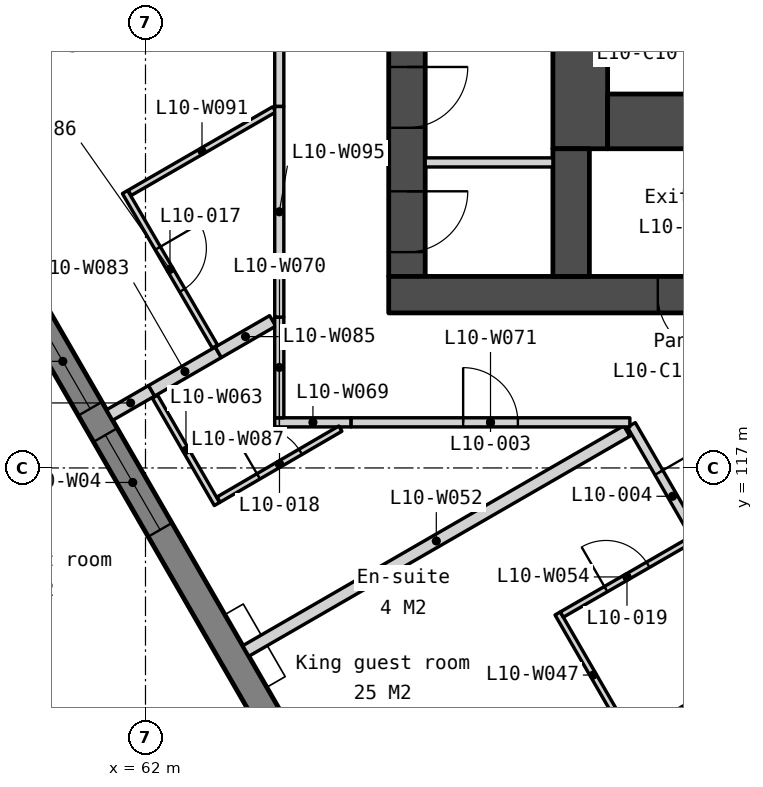
"""IFC4 building model, lengths in metres.
Left out: names, types, materials, properties, quantities, classifications, styles, units other than length and angle.
Written with IfcOpenShell. Run it as: python <this file> out.ifc"""

import sys

from ifc_helpers import new_model, si_unit, direction, frame, frame_2d, origin, place, context, subcontext, project, spatial, polyline, rectangle, outline, extrude, element, fill, save


model = new_model("IFC4")
c1 = context("Model", 3, precision=1e-05, world=origin(), true_north=direction((0.0, 1.0)))
c2 = subcontext(c1, "Body", "Model", "MODEL_VIEW")
j1 = project(units=[si_unit("LENGTHUNIT", "METRE"), si_unit("PLANEANGLEUNIT", "RADIAN")], contexts=[c1])
p1 = place(None, origin())
s1 = spatial("IfcSite", under=j1, at=p1, CompositionType="ELEMENT")
p2 = place(p1, origin())
s2 = spatial("IfcBuilding", under=s1, at=p2, CompositionType="ELEMENT")
p3 = place(p2, frame((0.0, 0.0, 49.0)))
s3 = spatial("IfcBuildingStorey", under=s2, at=p3, CompositionType="ELEMENT", Elevation=49.0)
p4 = place(p3, frame((66.3, 133.95, 0.0), z_axis=(0.0, 0.0, 1.0), x_axis=(0.0, -1.0, 0.0)))
e1 = element("IfcWall", 1, at=p4, inside=s3, PredefinedType="SOLIDWALL", context=c2, shape_type="SweptSolid", body=[
    extrude(rectangle(XDim=13.8, YDim=0.6, at=frame_2d((6.9, 0.0))), origin(), (0.0, 0.0, 1.0), 3.35),
])
p5 = place(p4, frame((0.6, 0.0, 0.0)))
e2 = element("IfcOpeningElement", 2, at=p5, cuts=e1, PredefinedType="OPENING", context=c2, shape_type="SweptSolid", body=[
    extrude(rectangle(XDim=1.1, YDim=2.1, at=frame_2d((0.55, 1.05))), frame((0.0, 0.31, 0.0), z_axis=(0.0, -1.0, 0.0), x_axis=(1.0, 0.0, 0.0)), (0.0, 0.0, 1.0), 0.62),
])
p6 = place(p4, frame((8.405, 0.0, 0.0)))
e3 = element("IfcOpeningElement", 3, at=p6, cuts=e1, PredefinedType="OPENING", context=c2, shape_type="SweptSolid", body=[
    extrude(rectangle(XDim=1.0, YDim=2.1, at=frame_2d((0.5, 1.05))), frame((0.0, 0.31, 0.0), z_axis=(0.0, -1.0, 0.0), x_axis=(1.0, 0.0, 0.0)), (0.0, 0.0, 1.0), 0.62),
])
p7 = place(p4, frame((10.355, 0.0, 0.0)))
e4 = element("IfcOpeningElement", 4, at=p7, cuts=e1, PredefinedType="OPENING", context=c2, shape_type="SweptSolid", body=[
    extrude(rectangle(XDim=1.0, YDim=2.1, at=frame_2d((0.5, 1.05))), frame((0.0, 0.31, 0.0), z_axis=(0.0, -1.0, 0.0), x_axis=(1.0, 0.0, 0.0)), (0.0, 0.0, 1.0), 0.62),
])
p8 = place(p4, frame((12.4, 0.0, 0.0)))
e5 = element("IfcOpeningElement", 5, at=p8, cuts=e1, PredefinedType="OPENING", context=c2, shape_type="SweptSolid", body=[
    extrude(rectangle(XDim=1.0, YDim=2.1, at=frame_2d((0.5, 1.05))), frame((0.0, 0.31, 0.0), z_axis=(0.0, -1.0, 0.0), x_axis=(1.0, 0.0, 0.0)), (0.0, 0.0, 1.0), 0.62),
])
p9 = place(p3, frame((66.0, 119.85, 0.0), z_axis=(0.0, 0.0, 1.0), x_axis=(1.0, 0.0, 0.0)))
e6 = element("IfcWall", 6, at=p9, inside=s3, PredefinedType="SOLIDWALL", context=c2, shape_type="SweptSolid", body=[
    extrude(rectangle(XDim=28.0, YDim=0.6, at=frame_2d((14.0, 0.0))), origin(), (0.0, 0.0, 1.0), 3.35),
])
p10 = place(p9, frame((6.825, 0.0, 0.0)))
e7 = element("IfcOpeningElement", 7, at=p10, cuts=e6, PredefinedType="OPENING", context=c2, shape_type="SweptSolid", body=[
    extrude(rectangle(XDim=1.8, YDim=2.1, at=frame_2d((0.9, 1.05))), frame((0.0, 0.31, 0.0), z_axis=(0.0, -1.0, 0.0), x_axis=(1.0, 0.0, 0.0)), (0.0, 0.0, 1.0), 0.62),
])
p11 = place(p9, frame((15.85, 0.0, 0.0)))
e8 = element("IfcOpeningElement", 8, at=p11, cuts=e6, PredefinedType="OPENING", context=c2, shape_type="SweptSolid", body=[
    extrude(rectangle(XDim=1.5, YDim=2.1, at=frame_2d((0.75, 1.05))), frame((0.0, 0.31, 0.0), z_axis=(0.0, -1.0, 0.0), x_axis=(1.0, 0.0, 0.0)), (0.0, 0.0, 1.0), 0.62),
])
p12 = place(p9, frame((19.375, 0.0, 0.0)))
e9 = element("IfcOpeningElement", 9, at=p12, cuts=e6, PredefinedType="OPENING", context=c2, shape_type="SweptSolid", body=[
    extrude(rectangle(XDim=1.8, YDim=2.1, at=frame_2d((0.9, 1.05))), frame((0.0, 0.31, 0.0), z_axis=(0.0, -1.0, 0.0), x_axis=(1.0, 0.0, 0.0)), (0.0, 0.0, 1.0), 0.62),
])
p13 = place(p9, frame((4.425, 0.0, 0.0)))
e10 = element("IfcOpeningElement", 10, at=p13, cuts=e6, PredefinedType="OPENING", context=c2, shape_type="SweptSolid", body=[
    extrude(rectangle(XDim=1.0, YDim=2.1, at=frame_2d((0.5, 1.05))), frame((0.0, 0.31, 0.0), z_axis=(0.0, -1.0, 0.0), x_axis=(1.0, 0.0, 0.0)), (0.0, 0.0, 1.0), 0.62),
])
p14 = place(p9, frame((9.783, 0.0, 0.0)))
e11 = element("IfcOpeningElement", 11, at=p14, cuts=e6, PredefinedType="OPENING", context=c2, shape_type="SweptSolid", body=[
    extrude(rectangle(XDim=1.0, YDim=2.1, at=frame_2d((0.5, 1.05))), frame((0.0, 0.31, 0.0), z_axis=(0.0, -1.0, 0.0), x_axis=(1.0, 0.0, 0.0)), (0.0, 0.0, 1.0), 0.62),
])
p15 = place(p9, frame((11.525, 0.0, 0.0)))
e12 = element("IfcOpeningElement", 12, at=p15, cuts=e6, PredefinedType="OPENING", context=c2, shape_type="SweptSolid", body=[
    extrude(rectangle(XDim=1.0, YDim=2.1, at=frame_2d((0.5, 1.05))), frame((0.0, 0.31, 0.0), z_axis=(0.0, -1.0, 0.0), x_axis=(1.0, 0.0, 0.0)), (0.0, 0.0, 1.0), 0.62),
])
p16 = place(p9, frame((13.658, 0.0, 0.0)))
e13 = element("IfcOpeningElement", 13, at=p16, cuts=e6, PredefinedType="OPENING", context=c2, shape_type="SweptSolid", body=[
    extrude(rectangle(XDim=1.0, YDim=2.1, at=frame_2d((0.5, 1.05))), frame((0.0, 0.31, 0.0), z_axis=(0.0, -1.0, 0.0), x_axis=(1.0, 0.0, 0.0)), (0.0, 0.0, 1.0), 0.62),
])
p17 = place(p9, frame((21.725, 0.0, 0.0)))
e14 = element("IfcOpeningElement", 14, at=p17, cuts=e6, PredefinedType="OPENING", context=c2, shape_type="SweptSolid", body=[
    extrude(rectangle(XDim=1.0, YDim=2.1, at=frame_2d((0.5, 1.05))), frame((0.0, 0.31, 0.0), z_axis=(0.0, -1.0, 0.0), x_axis=(1.0, 0.0, 0.0)), (0.0, 0.0, 1.0), 0.62),
])
p18 = place(p9, frame((23.425, 0.0, 0.0)))
e15 = element("IfcOpeningElement", 15, at=p18, cuts=e6, PredefinedType="OPENING", context=c2, shape_type="SweptSolid", body=[
    extrude(rectangle(XDim=1.0, YDim=2.1, at=frame_2d((0.5, 1.05))), frame((0.0, 0.31, 0.0), z_axis=(0.0, -1.0, 0.0), x_axis=(1.0, 0.0, 0.0)), (0.0, 0.0, 1.0), 0.62),
])
p19 = place(p3, frame((66.6, 122.025, 0.0), z_axis=(0.0, 0.0, 1.0), x_axis=(1.0, 0.0, 0.0)))
e16 = element("IfcWall", 16, at=p19, inside=s3, PredefinedType="PARTITIONING", context=c2, shape_type="SweptSolid", body=[
    extrude(rectangle(XDim=2.1, YDim=0.15, at=frame_2d((1.05, 0.0))), origin(), (0.0, 0.0, 1.0), 3.35),
])
p20 = place(p3, frame((69.15, 133.95, 0.0), z_axis=(0.0, 0.0, 1.0), x_axis=(0.0, -1.0, 0.0)))
e17 = element("IfcWall", 17, at=p20, inside=s3, PredefinedType="SOLIDWALL", context=c2, shape_type="SweptSolid", body=[
    extrude(rectangle(XDim=11.7, YDim=0.9, at=frame_2d((5.85, 0.0))), origin(), (0.0, 0.0, 1.0), 3.35),
])
p21 = place(p3, frame((69.0, 122.25, 0.0), z_axis=(0.0, 0.0, 1.0), x_axis=(0.0, -1.0, 0.0)))
e18 = element("IfcWall", 18, at=p21, inside=s3, PredefinedType="SOLIDWALL", context=c2, shape_type="SweptSolid", body=[
    extrude(rectangle(XDim=2.1, YDim=0.6, at=frame_2d((1.05, 0.0))), origin(), (0.0, 0.0, 1.0), 3.35),
])
p22 = place(p3, frame((69.6, 122.7, 0.0), z_axis=(0.0, 0.0, 1.0), x_axis=(1.0, 0.0, 0.0)))
e19 = element("IfcWall", 19, at=p22, inside=s3, PredefinedType="SOLIDWALL", context=c2, shape_type="SweptSolid", body=[
    extrude(rectangle(XDim=2.55, YDim=0.9, at=frame_2d((1.275, 0.0))), origin(), (0.0, 0.0, 1.0), 3.35),
])
p23 = place(p3, frame((54.495, 129.397, -0.15), z_axis=(0.0, 0.0, 1.0), x_axis=(0.499999201451, -0.866025864826, 0.0)))
e20 = element("IfcWall", 20, at=p23, inside=s3, PredefinedType="SOLIDWALL", context=c2, shape_type="SweptSolid", body=[
    extrude(outline(polyline([(44.8, 0.0), (44.8, 3.5), (0.0, 3.5), (0.0, 0.0), (44.8, 0.0)])), frame((0.0, 0.225, 0.0), z_axis=(0.0, -1.0, 0.0), x_axis=(1.0, 0.0, 0.0)), (0.0, 0.0, 1.0), 0.45),
])
p24 = place(p23, frame((2.43, 0.0, 1.05)))
e21 = element("IfcOpeningElement", 21, at=p24, cuts=e20, PredefinedType="OPENING", context=c2, shape_type="SweptSolid", body=[
    extrude(rectangle(XDim=1.8, YDim=1.5, at=frame_2d((0.9, 0.75))), frame((0.0, 0.235, 0.0), z_axis=(0.0, -1.0, 0.0), x_axis=(1.0, 0.0, 0.0)), (0.0, 0.0, 1.0), 0.47),
])
p25 = place(p23, frame((4.73, 0.0, 1.05)))
e22 = element("IfcOpeningElement", 22, at=p25, cuts=e20, PredefinedType="OPENING", context=c2, shape_type="SweptSolid", body=[
    extrude(rectangle(XDim=1.8, YDim=1.5, at=frame_2d((0.9, 0.75))), frame((0.0, 0.235, 0.0), z_axis=(0.0, -1.0, 0.0), x_axis=(1.0, 0.0, 0.0)), (0.0, 0.0, 1.0), 0.47),
])
p26 = place(p23, frame((11.39, 0.0, 1.05)))
e23 = element("IfcOpeningElement", 23, at=p26, cuts=e20, PredefinedType="OPENING", context=c2, shape_type="SweptSolid", body=[
    extrude(rectangle(XDim=1.8, YDim=1.5, at=frame_2d((0.9, 0.75))), frame((0.0, 0.235, 0.0), z_axis=(0.0, -1.0, 0.0), x_axis=(1.0, 0.0, 0.0)), (0.0, 0.0, 1.0), 0.47),
])
p27 = place(p23, frame((13.69, 0.0, 1.05)))
e24 = element("IfcOpeningElement", 24, at=p27, cuts=e20, PredefinedType="OPENING", context=c2, shape_type="SweptSolid", body=[
    extrude(rectangle(XDim=1.8, YDim=1.5, at=frame_2d((0.9, 0.75))), frame((0.0, 0.235, 0.0), z_axis=(0.0, -1.0, 0.0), x_axis=(1.0, 0.0, 0.0)), (0.0, 0.0, 1.0), 0.47),
])
p28 = place(p23, frame((20.35, 0.0, 1.05)))
e25 = element("IfcOpeningElement", 25, at=p28, cuts=e20, PredefinedType="OPENING", context=c2, shape_type="SweptSolid", body=[
    extrude(rectangle(XDim=1.8, YDim=1.5, at=frame_2d((0.9, 0.75))), frame((0.0, 0.235, 0.0), z_axis=(0.0, -1.0, 0.0), x_axis=(1.0, 0.0, 0.0)), (0.0, 0.0, 1.0), 0.47),
])
p29 = place(p23, frame((22.65, 0.0, 1.05)))
e26 = element("IfcOpeningElement", 26, at=p29, cuts=e20, PredefinedType="OPENING", context=c2, shape_type="SweptSolid", body=[
    extrude(rectangle(XDim=1.8, YDim=1.5, at=frame_2d((0.9, 0.75))), frame((0.0, 0.235, 0.0), z_axis=(0.0, -1.0, 0.0), x_axis=(1.0, 0.0, 0.0)), (0.0, 0.0, 1.0), 0.47),
])
p30 = place(p23, frame((29.31, 0.0, 1.05)))
e27 = element("IfcOpeningElement", 27, at=p30, cuts=e20, PredefinedType="OPENING", context=c2, shape_type="SweptSolid", body=[
    extrude(rectangle(XDim=1.8, YDim=1.5, at=frame_2d((0.9, 0.75))), frame((0.0, 0.235, 0.0), z_axis=(0.0, -1.0, 0.0), x_axis=(1.0, 0.0, 0.0)), (0.0, 0.0, 1.0), 0.47),
])
p31 = place(p23, frame((31.61, 0.0, 1.05)))
e28 = element("IfcOpeningElement", 28, at=p31, cuts=e20, PredefinedType="OPENING", context=c2, shape_type="SweptSolid", body=[
    extrude(rectangle(XDim=1.8, YDim=1.5, at=frame_2d((0.9, 0.75))), frame((0.0, 0.235, 0.0), z_axis=(0.0, -1.0, 0.0), x_axis=(1.0, 0.0, 0.0)), (0.0, 0.0, 1.0), 0.47),
])
p32 = place(p23, frame((38.27, 0.0, 1.05)))
e29 = element("IfcOpeningElement", 29, at=p32, cuts=e20, PredefinedType="OPENING", context=c2, shape_type="SweptSolid", body=[
    extrude(rectangle(XDim=1.8, YDim=1.5, at=frame_2d((0.9, 0.75))), frame((0.0, 0.235, 0.0), z_axis=(0.0, -1.0, 0.0), x_axis=(1.0, 0.0, 0.0)), (0.0, 0.0, 1.0), 0.47),
])
p33 = place(p23, frame((40.57, 0.0, 1.05)))
e30 = element("IfcOpeningElement", 30, at=p33, cuts=e20, PredefinedType="OPENING", context=c2, shape_type="SweptSolid", body=[
    extrude(rectangle(XDim=1.8, YDim=1.5, at=frame_2d((0.9, 0.75))), frame((0.0, 0.235, 0.0), z_axis=(0.0, -1.0, 0.0), x_axis=(1.0, 0.0, 0.0)), (0.0, 0.0, 1.0), 0.47),
])
p34 = place(p3, frame((65.89, 110.11, 0.0), z_axis=(0.0, 0.0, 1.0), x_axis=(0.8660384094, 0.499977472937, 0.0)))
e31 = element("IfcWall", 31, at=p34, inside=s3, PredefinedType="PARTITIONING", context=c2, shape_type="SweptSolid", body=[
    extrude(rectangle(XDim=7.265, YDim=0.2, at=frame_2d((3.632, 0.0))), origin(), (0.0, 0.0, 1.0), 3.35),
])
p35 = place(p3, frame((68.778, 114.607, 0.0), z_axis=(0.0, 0.0, 1.0), x_axis=(0.499999433879, -0.866025730634, 0.0)))
e32 = element("IfcWall", 32, at=p35, inside=s3, PredefinedType="PARTITIONING", context=c2, shape_type="SweptSolid", body=[
    extrude(rectangle(XDim=2.34, YDim=0.1, at=frame_2d((1.17, 0.0))), origin(), (0.0, 0.0, 1.0), 3.35),
])
p36 = place(p3, frame((69.99, 117.708, 0.0), z_axis=(0.0, 0.0, 1.0), x_axis=(0.499982154961, -0.866035706378, 0.0)))
e33 = element("IfcWall", 33, at=p36, inside=s3, PredefinedType="PARTITIONING", context=c2, shape_type="SweptSolid", body=[
    extrude(rectangle(XDim=4.53, YDim=0.15, at=frame_2d((2.265, 0.0))), origin(), (0.0, 0.0, 1.0), 3.35),
])
p37 = place(p36, frame((0.906, 0.0, 0.0)))
e34 = element("IfcOpeningElement", 34, at=p37, cuts=e33, PredefinedType="OPENING", context=c2, shape_type="SweptSolid", body=[
    extrude(rectangle(XDim=0.9, YDim=2.1, at=frame_2d((0.45, 1.05))), frame((0.0, 0.085, 0.0), z_axis=(0.0, -1.0, 0.0), x_axis=(1.0, 0.0, 0.0)), (0.0, 0.0, 1.0), 0.17),
])
p38 = place(p3, frame((63.65, 113.99, 0.0), z_axis=(0.0, 0.0, 1.0), x_axis=(0.866012505881, 0.500022339158, 0.0)))
e35 = element("IfcWall", 35, at=p38, inside=s3, PredefinedType="PARTITIONING", context=c2, shape_type="SweptSolid", body=[
    extrude(rectangle(XDim=7.235, YDim=0.2, at=frame_2d((3.618, 0.0))), origin(), (0.0, 0.0, 1.0), 3.35),
])
p39 = place(p3, frame((68.847, 114.589, 0.0), z_axis=(0.0, 0.0, 1.0), x_axis=(0.866006523861, 0.500032699561, 0.0)))
e36 = element("IfcWall", 36, at=p39, inside=s3, PredefinedType="PARTITIONING", context=c2, shape_type="SweptSolid", body=[
    extrude(rectangle(XDim=2.475, YDim=0.1, at=frame_2d((1.237, 0.0))), origin(), (0.0, 0.0, 1.0), 3.35),
])
p40 = place(p39, frame((0.837, 0.0, 0.0)))
e37 = element("IfcOpeningElement", 37, at=p40, cuts=e36, PredefinedType="OPENING", context=c2, shape_type="SweptSolid", body=[
    extrude(rectangle(XDim=0.8, YDim=2.1, at=frame_2d((0.4, 1.05))), frame((0.0, 0.06, 0.0), z_axis=(0.0, -1.0, 0.0), x_axis=(1.0, 0.0, 0.0)), (0.0, 0.0, 1.0), 0.12),
])
p41 = place(p3, frame((62.156, 118.173, 0.0), z_axis=(0.0, 0.0, 1.0), x_axis=(0.500026340207, -0.866010195725, 0.0)))
e38 = element("IfcWall", 38, at=p41, inside=s3, PredefinedType="PARTITIONING", context=c2, shape_type="SweptSolid", body=[
    extrude(rectangle(XDim=2.04, YDim=0.1, at=frame_2d((1.02, 0.0))), origin(), (0.0, 0.0, 1.0), 3.35),
])
p42 = place(p3, frame((64.125, 117.75, 0.0), z_axis=(0.0, 0.0, 1.0), x_axis=(1.0, 0.0, 0.0)))
e39 = element("IfcWall", 39, at=p42, inside=s3, PredefinedType="PARTITIONING", context=c2, shape_type="SweptSolid", body=[
    extrude(rectangle(XDim=1.257, YDim=0.15, at=frame_2d((0.628, 0.0))), origin(), (0.0, 0.0, 1.0), 3.35),
])
p43 = place(p3, frame((63.202, 116.48, 0.0), z_axis=(0.0, 0.0, 1.0), x_axis=(0.864103474136, 0.503314202051, 0.0)))
e40 = element("IfcWall", 40, at=p43, inside=s3, PredefinedType="PARTITIONING", context=c2, shape_type="SweptSolid", body=[
    extrude(rectangle(XDim=2.318, YDim=0.1, at=frame_2d((1.159, 0.0))), origin(), (0.0, 0.0, 1.0), 3.35),
])
p44 = place(p43, frame((0.759, 0.0, 0.0)))
e41 = element("IfcOpeningElement", 41, at=p44, cuts=e40, PredefinedType="OPENING", context=c2, shape_type="SweptSolid", body=[
    extrude(rectangle(XDim=0.8, YDim=2.1, at=frame_2d((0.4, 1.05))), frame((0.0, 0.06, 0.0), z_axis=(0.0, -1.0, 0.0), x_axis=(1.0, 0.0, 0.0)), (0.0, 0.0, 1.0), 0.12),
])
p45 = place(p3, frame((65.382, 117.75, 0.0), z_axis=(0.0, 0.0, 1.0), x_axis=(1.0, 0.0, 0.0)))
e42 = element("IfcWall", 42, at=p45, inside=s3, PredefinedType="PARTITIONING", context=c2, shape_type="SweptSolid", body=[
    extrude(rectangle(XDim=4.584, YDim=0.15, at=frame_2d((2.292, 0.0))), origin(), (0.0, 0.0, 1.0), 2.938),
])
p46 = place(p45, frame((1.842, 0.0, 0.0)))
e43 = element("IfcOpeningElement", 43, at=p46, cuts=e42, PredefinedType="OPENING", context=c2, shape_type="SweptSolid", body=[
    extrude(rectangle(XDim=0.9, YDim=2.1, at=frame_2d((0.45, 1.05))), frame((0.0, 0.085, 0.0), z_axis=(0.0, -1.0, 0.0), x_axis=(1.0, 0.0, 0.0)), (0.0, 0.0, 1.0), 0.17),
])
p47 = place(p3, frame((61.41, 117.87, 0.0), z_axis=(0.0, 0.0, 1.0), x_axis=(0.866068339032, 0.499925626596, 0.0)))
e44 = element("IfcWall", 44, at=p47, inside=s3, PredefinedType="PARTITIONING", context=c2, shape_type="SweptSolid", body=[
    extrude(rectangle(XDim=0.797, YDim=0.2, at=frame_2d((0.399, 0.0))), origin(), (0.0, 0.0, 1.0), 3.35),
])
p48 = place(p3, frame((62.1, 118.269, 0.0), z_axis=(0.0, 0.0, 1.0), x_axis=(0.866028304915, 0.499994975061, 0.0)))
e45 = element("IfcWall", 45, at=p48, inside=s3, PredefinedType="PARTITIONING", context=c2, shape_type="SweptSolid", body=[
    extrude(rectangle(XDim=1.267, YDim=0.2, at=frame_2d((0.633, 0.0))), origin(), (0.0, 0.0, 1.0), 3.35),
])
p49 = place(p3, frame((63.197, 118.902, 0.0), z_axis=(0.0, 0.0, 1.0), x_axis=(0.866067506982, 0.499927068031, 0.0)))
e46 = element("IfcWall", 46, at=p49, inside=s3, PredefinedType="PARTITIONING", context=c2, shape_type="SweptSolid", body=[
    extrude(rectangle(XDim=1.033, YDim=0.2, at=frame_2d((0.517, 0.0))), origin(), (0.0, 0.0, 1.0), 3.35),
])
p50 = place(p3, frame((61.663, 121.538, 0.0), z_axis=(0.0, 0.0, 1.0), x_axis=(0.502884554521, -0.864353587847, 0.0)))
e47 = element("IfcWall", 47, at=p50, inside=s3, PredefinedType="PARTITIONING", context=c2, shape_type="SweptSolid", body=[
    extrude(rectangle(XDim=2.94, YDim=0.1, at=frame_2d((1.47, 0.0))), origin(), (0.0, 0.0, 1.0), 3.35),
])
p51 = place(p50, frame((1.07, 0.0, 0.0)))
e48 = element("IfcOpeningElement", 48, at=p51, cuts=e47, PredefinedType="OPENING", context=c2, shape_type="SweptSolid", body=[
    extrude(rectangle(XDim=0.8, YDim=2.1, at=frame_2d((0.4, 1.05))), frame((0.0, 0.06, 0.0), z_axis=(0.0, -1.0, 0.0), x_axis=(1.0, 0.0, 0.0)), (0.0, 0.0, 1.0), 0.12),
])
p52 = place(p3, frame((64.2, 117.825, 0.0), z_axis=(0.0, 0.0, 1.0), x_axis=(0.0, 1.0, 0.0)))
e49 = element("IfcWall", 49, at=p52, inside=s3, PredefinedType="PARTITIONING", context=c2, shape_type="SweptSolid", body=[
    extrude(rectangle(XDim=1.656, YDim=0.15, at=frame_2d((0.828, 0.0))), origin(), (0.0, 0.0, 1.0), 3.35),
])
p53 = place(p3, frame((61.74, 121.525, 0.0), z_axis=(0.0, 0.0, 1.0), x_axis=(0.866012292785, 0.50002270823, 0.0)))
e50 = element("IfcWall", 50, at=p53, inside=s3, PredefinedType="PARTITIONING", context=c2, shape_type="SweptSolid", body=[
    extrude(rectangle(XDim=2.745, YDim=0.1, at=frame_2d((1.373, 0.0))), origin(), (0.0, 0.0, 1.0), 3.35),
])
p54 = place(p3, frame((64.2, 122.945, 0.0), z_axis=(0.0, 0.0, 1.0), x_axis=(0.0, 1.0, 0.0)))
e51 = element("IfcWall", 51, at=p54, inside=s3, PredefinedType="PARTITIONING", context=c2, shape_type="SweptSolid", body=[
    extrude(rectangle(XDim=3.63, YDim=0.15, at=frame_2d((1.815, 0.0))), origin(), (0.0, 0.0, 1.0), 3.35),
])
p55 = place(p3, frame((64.2, 119.481, 0.0), z_axis=(0.0, 0.0, 1.0), x_axis=(0.0, 1.0, 0.0)))
e52 = element("IfcWall", 52, at=p55, inside=s3, PredefinedType="PARTITIONING", context=c2, shape_type="SweptSolid", body=[
    extrude(rectangle(XDim=3.464, YDim=0.15, at=frame_2d((1.732, 0.0))), origin(), (0.0, 0.0, 1.0), 3.35),
])
p56 = place(p13, origin())
e53 = element("IfcDoor", 53, at=p56, inside=s3, OperationType="SINGLE_SWING_RIGHT", PredefinedType="DOOR", context=c2, shape_type="SweptSolid", body=[
    extrude(rectangle(XDim=1.0, YDim=2.1, at=frame_2d((0.5, 1.05))), frame((0.0, 0.025, 0.0), z_axis=(0.0, -1.0, 0.0), x_axis=(1.0, 0.0, 0.0)), (0.0, 0.0, 1.0), 0.05),
])
fill(e10, e53)
p57 = place(p7, origin())
e54 = element("IfcDoor", 54, at=p57, inside=s3, OperationType="SINGLE_SWING_LEFT", PredefinedType="DOOR", context=c2, shape_type="SweptSolid", body=[
    extrude(rectangle(XDim=1.0, YDim=2.1, at=frame_2d((0.5, 1.05))), frame((0.0, 0.025, 0.0), z_axis=(0.0, -1.0, 0.0), x_axis=(1.0, 0.0, 0.0)), (0.0, 0.0, 1.0), 0.05),
])
fill(e4, e54)
p58 = place(p8, origin())
e55 = element("IfcDoor", 55, at=p58, inside=s3, OperationType="SINGLE_SWING_LEFT", PredefinedType="DOOR", context=c2, shape_type="SweptSolid", body=[
    extrude(rectangle(XDim=1.0, YDim=2.1, at=frame_2d((0.5, 1.05))), frame((0.0, 0.025, 0.0), z_axis=(0.0, -1.0, 0.0), x_axis=(1.0, 0.0, 0.0)), (0.0, 0.0, 1.0), 0.05),
])
fill(e5, e55)
p59 = place(p26, origin())
e56 = element("IfcWindow", 56, at=p59, inside=s3, PartitioningType="SINGLE_PANEL", PredefinedType="WINDOW", context=c2, shape_type="SweptSolid", body=[
    extrude(rectangle(XDim=1.8, YDim=1.5, at=frame_2d((0.9, 0.75))), frame((0.0, 0.03, 0.0), z_axis=(0.0, -1.0, 0.0), x_axis=(1.0, 0.0, 0.0)), (0.0, 0.0, 1.0), 0.06),
])
fill(e23, e56)
p60 = place(p27, origin())
e57 = element("IfcWindow", 57, at=p60, inside=s3, PartitioningType="SINGLE_PANEL", PredefinedType="WINDOW", context=c2, shape_type="SweptSolid", body=[
    extrude(rectangle(XDim=1.8, YDim=1.5, at=frame_2d((0.9, 0.75))), frame((0.0, 0.03, 0.0), z_axis=(0.0, -1.0, 0.0), x_axis=(1.0, 0.0, 0.0)), (0.0, 0.0, 1.0), 0.06),
])
fill(e24, e57)
p61 = place(p46, origin())
e58 = element("IfcDoor", 58, at=p61, inside=s3, OperationType="SINGLE_SWING_LEFT", PredefinedType="DOOR", context=c2, shape_type="SweptSolid", body=[
    extrude(rectangle(XDim=0.9, YDim=2.1, at=frame_2d((0.45, 1.05))), frame((0.0, 0.025, 0.0), z_axis=(0.0, -1.0, 0.0), x_axis=(1.0, 0.0, 0.0)), (0.0, 0.0, 1.0), 0.05),
])
fill(e43, e58)
p62 = place(p37, origin())
e59 = element("IfcDoor", 59, at=p62, inside=s3, OperationType="SINGLE_SWING_LEFT", PredefinedType="DOOR", context=c2, shape_type="SweptSolid", body=[
    extrude(rectangle(XDim=0.9, YDim=2.1, at=frame_2d((0.45, 1.05))), frame((0.0, 0.025, 0.0), z_axis=(0.0, -1.0, 0.0), x_axis=(1.0, 0.0, 0.0)), (0.0, 0.0, 1.0), 0.05),
])
fill(e34, e59)
p63 = place(p51, origin())
e60 = element("IfcDoor", 60, at=p63, inside=s3, OperationType="SINGLE_SWING_LEFT", PredefinedType="DOOR", context=c2, shape_type="SweptSolid", body=[
    extrude(rectangle(XDim=0.8, YDim=2.1, at=frame_2d((0.4, 1.05))), frame((0.0, 0.025, 0.0), z_axis=(0.0, -1.0, 0.0), x_axis=(1.0, 0.0, 0.0)), (0.0, 0.0, 1.0), 0.05),
])
fill(e48, e60)
p64 = place(p44, origin())
e61 = element("IfcDoor", 61, at=p64, inside=s3, OperationType="SINGLE_SWING_LEFT", PredefinedType="DOOR", context=c2, shape_type="SweptSolid", body=[
    extrude(rectangle(XDim=0.8, YDim=2.1, at=frame_2d((0.4, 1.05))), frame((0.0, 0.025, 0.0), z_axis=(0.0, -1.0, 0.0), x_axis=(1.0, 0.0, 0.0)), (0.0, 0.0, 1.0), 0.05),
])
fill(e41, e61)
p65 = place(p40, origin())
e62 = element("IfcDoor", 62, at=p65, inside=s3, OperationType="SINGLE_SWING_LEFT", PredefinedType="DOOR", context=c2, shape_type="SweptSolid", body=[
    extrude(rectangle(XDim=0.8, YDim=2.1, at=frame_2d((0.4, 1.05))), frame((0.0, 0.025, 0.0), z_axis=(0.0, -1.0, 0.0), x_axis=(1.0, 0.0, 0.0)), (0.0, 0.0, 1.0), 0.05),
])
fill(e37, e62)
save(model, sys.argv[1])
